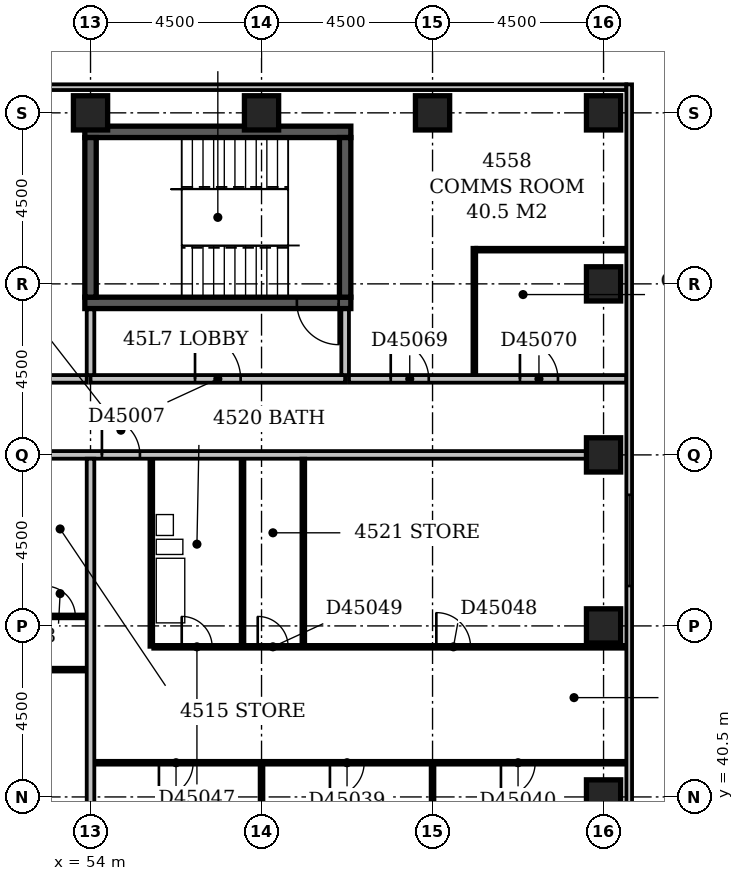
"""IFC4 building model, lengths in metres.
Left out: names, types, materials, properties, quantities, classifications, styles, units other than length and angle.
Written with IfcOpenShell. Run it as: python <this file> out.ifc"""

import sys

from ifc_helpers import new_model, si_unit, direction, frame, frame_2d, origin, origin_2d, place, context, subcontext, project, spatial, rectangle, extrude, element, fill, save


model = new_model("IFC4")
c1 = context("Model", 3, precision=1e-05, world=origin(), true_north=direction((0.0, 1.0)))
c2 = subcontext(c1, "Body", "Model", "MODEL_VIEW")
j1 = project(units=[si_unit("LENGTHUNIT", "METRE"), si_unit("PLANEANGLEUNIT", "RADIAN")], contexts=[c1])
p1 = place(None, origin())
s1 = spatial("IfcSite", under=j1, at=p1, CompositionType="ELEMENT")
p2 = place(p1, origin())
s2 = spatial("IfcBuilding", under=s1, at=p2, CompositionType="ELEMENT")
p3 = place(p2, frame((0.0, 0.0, 179.0)))
s3 = spatial("IfcBuildingStorey", under=s2, at=p3, CompositionType="ELEMENT", Elevation=179.0)
p4 = place(p3, frame((53.85, 53.5, -0.3), z_axis=(0.0, 0.0, 1.0), x_axis=(1.0, 0.0, 0.0)))
e1 = element("IfcWall", 1, at=p4, inside=s3, PredefinedType="SHEAR", context=c2, shape_type="SweptSolid", body=[
    extrude(rectangle(XDim=7.0, YDim=0.3, at=frame_2d((3.5, 0.0))), origin(), (0.0, 0.0, 1.0), 3.6),
])
p5 = place(p4, frame((5.58, 0.0, 0.3)))
e2 = element("IfcOpeningElement", 2, at=p5, cuts=e1, PredefinedType="OPENING", context=c2, shape_type="SweptSolid", body=[
    extrude(rectangle(XDim=1.1, YDim=2.1, at=frame_2d((0.55, 1.05))), frame((0.0, 0.162, 0.0), z_axis=(0.0, -1.0, 0.0), x_axis=(1.0, 0.0, 0.0)), (0.0, 0.0, 1.0), 0.324),
])
p6 = place(p3, frame((53.85, 58.0, -0.3), z_axis=(0.0, 0.0, 1.0), x_axis=(1.0, 0.0, 0.0)))
e3 = element("IfcWall", 3, at=p6, inside=s3, PredefinedType="SHEAR", context=c2, shape_type="SweptSolid", body=[
    extrude(rectangle(XDim=7.0, YDim=0.3, at=frame_2d((3.5, 0.0))), origin(), (0.0, 0.0, 1.0), 3.6),
])
for number, where, z_axis, x_axis in (
    (4, (54.0, 53.65, -0.3), (0.0, 0.0, 1.0), (0.0, 1.0, 0.0)),
    (5, (60.7, 53.65, -0.3), (0.0, 0.0, 1.0), (0.0, 1.0, 0.0)),
):
    element("IfcWall", number, at=place(p3, frame(where, z_axis=z_axis, x_axis=x_axis)), inside=s3, PredefinedType="SHEAR", context=c2, shape_type="SweptSolid", body=[
        extrude(rectangle(XDim=4.2, YDim=0.3, at=frame_2d((2.1, 0.0))), origin(), (0.0, 0.0, 1.0), 3.6),
    ])
for number, where, z_axis, x_axis in (
    (6, (67.5, 40.5, -0.3), (0.0, 0.0, 1.0), (1.0, 0.0, 0.0)),
    (7, (67.5, 45.0, -0.3), (0.0, 0.0, 1.0), (1.0, 0.0, 0.0)),
    (8, (67.5, 49.5, -0.3), (0.0, 0.0, 1.0), (1.0, 0.0, 0.0)),
    (9, (67.5, 54.0, -0.3), (0.0, 0.0, 1.0), (1.0, 0.0, 0.0)),
    (10, (54.0, 58.5, -0.3), (0.0, 0.0, 1.0), (1.0, 0.0, 0.0)),
    (11, (58.5, 58.5, -0.3), (0.0, 0.0, 1.0), (1.0, 0.0, 0.0)),
    (12, (63.0, 58.5, -0.3), (0.0, 0.0, 1.0), (1.0, 0.0, 0.0)),
    (13, (67.5, 58.5, -0.3), (0.0, 0.0, 1.0), (1.0, 0.0, 0.0)),
):
    element("IfcColumn", number, at=place(p3, frame(where, z_axis=z_axis, x_axis=x_axis)), inside=s3, PredefinedType="COLUMN", context=c2, shape_type="SweptSolid", body=[
        extrude(rectangle(XDim=0.9, YDim=0.9, at=origin_2d()), origin(), (0.0, 0.0, 1.0), 3.6),
    ])
p7 = place(p3, frame((68.175, 35.4, 0.0), z_axis=(0.0, 0.0, 1.0), x_axis=(0.0, 1.0, 0.0)))
e14 = element("IfcWall", 14, at=p7, inside=s3, PredefinedType="STANDARD", context=c2, shape_type="SweptSolid", body=[
    extrude(rectangle(XDim=23.85, YDim=0.15, at=frame_2d((11.925, 0.0))), origin(), (0.0, 0.0, 1.0), 2.7),
])
p8 = place(p7, frame((1.397, 0.0, 0.6)))
e15 = element("IfcOpeningElement", 15, at=p8, cuts=e14, PredefinedType="OPENING", context=c2, shape_type="SweptSolid", body=[
    extrude(rectangle(XDim=1.2, YDim=1.8, at=frame_2d((0.6, 0.9))), frame((0.0, 0.087, 0.0), z_axis=(0.0, -1.0, 0.0), x_axis=(1.0, 0.0, 0.0)), (0.0, 0.0, 1.0), 0.174),
])
p9 = place(p7, frame((10.65, 0.0, 0.6)))
e16 = element("IfcOpeningElement", 16, at=p9, cuts=e14, PredefinedType="OPENING", context=c2, shape_type="SweptSolid", body=[
    extrude(rectangle(XDim=2.4, YDim=1.8, at=frame_2d((1.2, 0.9))), frame((0.0, 0.087, 0.0), z_axis=(0.0, -1.0, 0.0), x_axis=(1.0, 0.0, 0.0)), (0.0, 0.0, 1.0), 0.174),
])
p10 = place(p3, frame((68.1, 59.175, 0.0), z_axis=(0.0, 0.0, 1.0), x_axis=(-1.0, 0.0, 0.0)))
e17 = element("IfcWall", 17, at=p10, inside=s3, PredefinedType="STANDARD", context=c2, shape_type="SweptSolid", body=[
    extrude(rectangle(XDim=68.85, YDim=0.15, at=frame_2d((34.425, 0.0))), origin(), (0.0, 0.0, 1.0), 2.7),
])
p11 = place(p3, frame((54.0, 51.5, 0.0), z_axis=(0.0, 0.0, 1.0), x_axis=(1.0, 0.0, 0.0)))
e18 = element("IfcWall", 18, at=p11, inside=s3, PredefinedType="PARTITIONING", context=c2, shape_type="SweptSolid", body=[
    extrude(rectangle(XDim=6.7, YDim=0.2, at=frame_2d((3.35, 0.0))), origin(), (0.0, 0.0, 1.0), 3.3),
])
p12 = place(p11, frame((2.75, 0.0, 0.0)))
e19 = element("IfcOpeningElement", 19, at=p12, cuts=e18, PredefinedType="OPENING", context=c2, shape_type="SweptSolid", body=[
    extrude(rectangle(XDim=1.2, YDim=2.1, at=frame_2d((0.6, 1.05))), frame((0.0, 0.112, 0.0), z_axis=(0.0, -1.0, 0.0), x_axis=(1.0, 0.0, 0.0)), (0.0, 0.0, 1.0), 0.224),
])
p13 = place(p3, frame((60.7, 51.6, 0.0), z_axis=(0.0, 0.0, 1.0), x_axis=(0.0, 1.0, 0.0)))
e20 = element("IfcWall", 20, at=p13, inside=s3, PredefinedType="PARTITIONING", context=c2, shape_type="SweptSolid", body=[
    extrude(rectangle(XDim=1.73, YDim=0.2, at=frame_2d((0.865, 0.0))), origin(), (0.0, 0.0, 1.0), 3.3),
])
p14 = place(p3, frame((54.0, 51.6, 0.0), z_axis=(0.0, 0.0, 1.0), x_axis=(0.0, 1.0, 0.0)))
e21 = element("IfcWall", 21, at=p14, inside=s3, PredefinedType="PARTITIONING", context=c2, shape_type="SweptSolid", body=[
    extrude(rectangle(XDim=1.73, YDim=0.2, at=frame_2d((0.865, 0.0))), origin(), (0.0, 0.0, 1.0), 2.6),
])
p15 = place(p3, frame((54.0, 36.45, 0.0), z_axis=(0.0, 0.0, 1.0), x_axis=(0.0, 1.0, 0.0)))
e22 = element("IfcWall", 22, at=p15, inside=s3, PredefinedType="PARTITIONING", context=c2, shape_type="SweptSolid", body=[
    extrude(rectangle(XDim=12.95, YDim=0.2, at=frame_2d((6.475, 0.0))), origin(), (0.0, 0.0, 1.0), 2.6),
])
p16 = place(p3, frame((58.5, 36.45, 0.0), z_axis=(0.0, 0.0, 1.0), x_axis=(0.0, 1.0, 0.0)))
e23 = element("IfcWall", 23, at=p16, inside=s3, PredefinedType="PARTITIONING", context=c2, shape_type="SweptSolid", body=[
    extrude(rectangle(XDim=4.9, YDim=0.1, at=frame_2d((2.45, 0.0))), origin(), (0.0, 0.0, 1.0), 3.3),
])
p17 = place(p3, frame((63.0, 36.45, 0.0), z_axis=(0.0, 0.0, 1.0), x_axis=(0.0, 1.0, 0.0)))
e24 = element("IfcWall", 24, at=p17, inside=s3, PredefinedType="PARTITIONING", context=c2, shape_type="SweptSolid", body=[
    extrude(rectangle(XDim=4.9, YDim=0.1, at=frame_2d((2.45, 0.0))), origin(), (0.0, 0.0, 1.0), 2.4),
])
p18 = place(p3, frame((54.1, 41.4, 0.0), z_axis=(0.0, 0.0, 1.0), x_axis=(1.0, 0.0, 0.0)))
e25 = element("IfcWall", 25, at=p18, inside=s3, PredefinedType="PARTITIONING", context=c2, shape_type="SweptSolid", body=[
    extrude(rectangle(XDim=14.0, YDim=0.1, at=frame_2d((7.0, 0.0))), origin(), (0.0, 0.0, 1.0), 3.3),
])
p19 = place(p18, frame((1.7, 0.0, 0.0)))
e26 = element("IfcOpeningElement", 26, at=p19, cuts=e25, PredefinedType="OPENING", context=c2, shape_type="SweptSolid", body=[
    extrude(rectangle(XDim=0.9, YDim=2.1, at=frame_2d((0.45, 1.05))), frame((0.0, 0.062, 0.0), z_axis=(0.0, -1.0, 0.0), x_axis=(1.0, 0.0, 0.0)), (0.0, 0.0, 1.0), 0.124),
])
p20 = place(p18, frame((6.2, 0.0, 0.0)))
e27 = element("IfcOpeningElement", 27, at=p20, cuts=e25, PredefinedType="OPENING", context=c2, shape_type="SweptSolid", body=[
    extrude(rectangle(XDim=0.9, YDim=2.1, at=frame_2d((0.45, 1.05))), frame((0.0, 0.062, 0.0), z_axis=(0.0, -1.0, 0.0), x_axis=(1.0, 0.0, 0.0)), (0.0, 0.0, 1.0), 0.124),
])
p21 = place(p18, frame((10.7, 0.0, 0.0)))
e28 = element("IfcOpeningElement", 28, at=p21, cuts=e25, PredefinedType="OPENING", context=c2, shape_type="SweptSolid", body=[
    extrude(rectangle(XDim=0.9, YDim=2.1, at=frame_2d((0.45, 1.05))), frame((0.0, 0.062, 0.0), z_axis=(0.0, -1.0, 0.0), x_axis=(1.0, 0.0, 0.0)), (0.0, 0.0, 1.0), 0.124),
])
p22 = place(p3, frame((40.6, 43.85, 0.0), z_axis=(0.0, 0.0, 1.0), x_axis=(1.0, 0.0, 0.0)))
e29 = element("IfcWall", 29, at=p22, inside=s3, PredefinedType="PARTITIONING", context=c2, shape_type="SweptSolid", body=[
    extrude(rectangle(XDim=13.3, YDim=0.1, at=frame_2d((6.65, 0.0))), origin(), (0.0, 0.0, 1.0), 3.3),
])
p23 = place(p22, frame((1.7, 0.0, 0.0)))
e30 = element("IfcOpeningElement", 30, at=p23, cuts=e29, PredefinedType="OPENING", context=c2, shape_type="SweptSolid", body=[
    extrude(rectangle(XDim=0.9, YDim=2.1, at=frame_2d((0.45, 1.05))), frame((0.0, 0.062, 0.0), z_axis=(0.0, -1.0, 0.0), x_axis=(1.0, 0.0, 0.0)), (0.0, 0.0, 1.0), 0.124),
])
p24 = place(p22, frame((6.2, 0.0, 0.0)))
e31 = element("IfcOpeningElement", 31, at=p24, cuts=e29, PredefinedType="OPENING", context=c2, shape_type="SweptSolid", body=[
    extrude(rectangle(XDim=0.9, YDim=2.1, at=frame_2d((0.45, 1.05))), frame((0.0, 0.062, 0.0), z_axis=(0.0, -1.0, 0.0), x_axis=(1.0, 0.0, 0.0)), (0.0, 0.0, 1.0), 0.124),
])
p25 = place(p22, frame((10.7, 0.0, 0.0)))
e32 = element("IfcOpeningElement", 32, at=p25, cuts=e29, PredefinedType="OPENING", context=c2, shape_type="SweptSolid", body=[
    extrude(rectangle(XDim=0.9, YDim=2.1, at=frame_2d((0.45, 1.05))), frame((0.0, 0.062, 0.0), z_axis=(0.0, -1.0, 0.0), x_axis=(1.0, 0.0, 0.0)), (0.0, 0.0, 1.0), 0.124),
])
p26 = place(p3, frame((55.6, 44.45, 0.0), z_axis=(0.0, 0.0, 1.0), x_axis=(0.0, 1.0, 0.0)))
e33 = element("IfcWall", 33, at=p26, inside=s3, PredefinedType="PLUMBINGWALL", context=c2, shape_type="SweptSolid", body=[
    extrude(rectangle(XDim=4.95, YDim=0.1, at=frame_2d((2.475, 0.0))), origin(), (0.0, 0.0, 1.0), 3.3),
])
p27 = place(p3, frame((55.65, 44.45, 0.0), z_axis=(0.0, 0.0, 1.0), x_axis=(1.0, 0.0, 0.0)))
e34 = element("IfcWall", 34, at=p27, inside=s3, PredefinedType="PARTITIONING", context=c2, shape_type="SweptSolid", body=[
    extrude(rectangle(XDim=12.45, YDim=0.1, at=frame_2d((6.225, 0.0))), origin(), (0.0, 0.0, 1.0), 3.3),
])
p28 = place(p27, frame((0.75, 0.0, 0.0)))
e35 = element("IfcOpeningElement", 35, at=p28, cuts=e34, PredefinedType="OPENING", context=c2, shape_type="SweptSolid", body=[
    extrude(rectangle(XDim=0.8, YDim=2.1, at=frame_2d((0.4, 1.05))), frame((0.0, 0.062, 0.0), z_axis=(0.0, -1.0, 0.0), x_axis=(1.0, 0.0, 0.0)), (0.0, 0.0, 1.0), 0.124),
])
p29 = place(p27, frame((7.45, 0.0, 0.0)))
e36 = element("IfcOpeningElement", 36, at=p29, cuts=e34, PredefinedType="OPENING", context=c2, shape_type="SweptSolid", body=[
    extrude(rectangle(XDim=0.9, YDim=2.1, at=frame_2d((0.45, 1.05))), frame((0.0, 0.062, 0.0), z_axis=(0.0, -1.0, 0.0), x_axis=(1.0, 0.0, 0.0)), (0.0, 0.0, 1.0), 0.124),
])
p30 = place(p27, frame((2.75, 0.0, 0.0)))
e37 = element("IfcOpeningElement", 37, at=p30, cuts=e34, PredefinedType="OPENING", context=c2, shape_type="SweptSolid", body=[
    extrude(rectangle(XDim=0.8, YDim=2.1, at=frame_2d((0.4, 1.05))), frame((0.0, 0.062, 0.0), z_axis=(0.0, -1.0, 0.0), x_axis=(1.0, 0.0, 0.0)), (0.0, 0.0, 1.0), 0.124),
])
p31 = place(p3, frame((58.0, 44.5, 0.0), z_axis=(0.0, 0.0, 1.0), x_axis=(0.0, 1.0, 0.0)))
e38 = element("IfcWall", 38, at=p31, inside=s3, PredefinedType="PLUMBINGWALL", context=c2, shape_type="SweptSolid", body=[
    extrude(rectangle(XDim=4.9, YDim=0.1, at=frame_2d((2.45, 0.0))), origin(), (0.0, 0.0, 1.0), 3.3),
])
p32 = place(p3, frame((59.6, 44.5, 0.0), z_axis=(0.0, 0.0, 1.0), x_axis=(0.0, 1.0, 0.0)))
e39 = element("IfcWall", 39, at=p32, inside=s3, PredefinedType="PARTITIONING", context=c2, shape_type="SweptSolid", body=[
    extrude(rectangle(XDim=4.9, YDim=0.1, at=frame_2d((2.45, 0.0))), origin(), (0.0, 0.0, 1.0), 3.3),
])
p33 = place(p3, frame((50.05, 45.25, 0.0), z_axis=(0.0, 0.0, 1.0), x_axis=(1.0, 0.0, 0.0)))
e40 = element("IfcWall", 40, at=p33, inside=s3, PredefinedType="PARTITIONING", context=c2, shape_type="SweptSolid", body=[
    extrude(rectangle(XDim=3.85, YDim=0.1, at=frame_2d((1.925, 0.0))), origin(), (0.0, 0.0, 1.0), 3.3),
])
p34 = place(p33, frame((0.75, 0.0, 0.0)))
e41 = element("IfcOpeningElement", 41, at=p34, cuts=e40, PredefinedType="OPENING", context=c2, shape_type="SweptSolid", body=[
    extrude(rectangle(XDim=0.8, YDim=2.1, at=frame_2d((0.4, 1.05))), frame((0.0, 0.062, 0.0), z_axis=(0.0, -1.0, 0.0), x_axis=(1.0, 0.0, 0.0)), (0.0, 0.0, 1.0), 0.124),
])
p35 = place(p33, frame((2.75, 0.0, 0.0)))
e42 = element("IfcOpeningElement", 42, at=p35, cuts=e40, PredefinedType="OPENING", context=c2, shape_type="SweptSolid", body=[
    extrude(rectangle(XDim=0.8, YDim=2.1, at=frame_2d((0.4, 1.05))), frame((0.0, 0.062, 0.0), z_axis=(0.0, -1.0, 0.0), x_axis=(1.0, 0.0, 0.0)), (0.0, 0.0, 1.0), 0.124),
])
p36 = place(p3, frame((22.6, 49.5, 0.0), z_axis=(0.0, 0.0, 1.0), x_axis=(1.0, 0.0, 0.0)))
e43 = element("IfcWall", 43, at=p36, inside=s3, PredefinedType="PARTITIONING", context=c2, shape_type="SweptSolid", body=[
    extrude(rectangle(XDim=44.45, YDim=0.2, at=frame_2d((22.225, 0.0))), origin(), (0.0, 0.0, 1.0), 3.3),
])
p37 = place(p36, frame((7.1, 0.0, 0.0)))
e44 = element("IfcOpeningElement", 44, at=p37, cuts=e43, PredefinedType="OPENING", context=c2, shape_type="SweptSolid", body=[
    extrude(rectangle(XDim=1.0, YDim=2.1, at=frame_2d((0.5, 1.05))), frame((0.0, 0.112, 0.0), z_axis=(0.0, -1.0, 0.0), x_axis=(1.0, 0.0, 0.0)), (0.0, 0.0, 1.0), 0.224),
])
p38 = place(p36, frame((26.1, 0.0, 0.0)))
e45 = element("IfcOpeningElement", 45, at=p38, cuts=e43, PredefinedType="OPENING", context=c2, shape_type="SweptSolid", body=[
    extrude(rectangle(XDim=1.0, YDim=2.1, at=frame_2d((0.5, 1.05))), frame((0.0, 0.112, 0.0), z_axis=(0.0, -1.0, 0.0), x_axis=(1.0, 0.0, 0.0)), (0.0, 0.0, 1.0), 0.224),
])
p39 = place(p36, frame((31.7, 0.0, 0.0)))
e46 = element("IfcOpeningElement", 46, at=p39, cuts=e43, PredefinedType="OPENING", context=c2, shape_type="SweptSolid", body=[
    extrude(rectangle(XDim=1.0, YDim=2.1, at=frame_2d((0.5, 1.05))), frame((0.0, 0.112, 0.0), z_axis=(0.0, -1.0, 0.0), x_axis=(1.0, 0.0, 0.0)), (0.0, 0.0, 1.0), 0.224),
])
p40 = place(p3, frame((44.1, 51.5, 0.0), z_axis=(0.0, 0.0, 1.0), x_axis=(1.0, 0.0, 0.0)))
e47 = element("IfcWall", 47, at=p40, inside=s3, PredefinedType="PARTITIONING", context=c2, shape_type="SweptSolid", body=[
    extrude(rectangle(XDim=9.8, YDim=0.2, at=frame_2d((4.9, 0.0))), origin(), (0.0, 0.0, 1.0), 3.3),
])
p41 = place(p40, frame((1.9, 0.0, 0.0)))
e48 = element("IfcOpeningElement", 48, at=p41, cuts=e47, PredefinedType="OPENING", context=c2, shape_type="SweptSolid", body=[
    extrude(rectangle(XDim=1.0, YDim=2.1, at=frame_2d((0.5, 1.05))), frame((0.0, 0.112, 0.0), z_axis=(0.0, -1.0, 0.0), x_axis=(1.0, 0.0, 0.0)), (0.0, 0.0, 1.0), 0.224),
])
p42 = place(p40, frame((6.9, 0.0, 0.0)))
e49 = element("IfcOpeningElement", 49, at=p42, cuts=e47, PredefinedType="OPENING", context=c2, shape_type="SweptSolid", body=[
    extrude(rectangle(XDim=1.0, YDim=2.1, at=frame_2d((0.5, 1.05))), frame((0.0, 0.112, 0.0), z_axis=(0.0, -1.0, 0.0), x_axis=(1.0, 0.0, 0.0)), (0.0, 0.0, 1.0), 0.224),
])
p43 = place(p3, frame((60.8, 51.5, 0.0), z_axis=(0.0, 0.0, 1.0), x_axis=(1.0, 0.0, 0.0)))
e50 = element("IfcWall", 50, at=p43, inside=s3, PredefinedType="PARTITIONING", context=c2, shape_type="SweptSolid", body=[
    extrude(rectangle(XDim=7.3, YDim=0.2, at=frame_2d((3.65, 0.0))), origin(), (0.0, 0.0, 1.0), 3.3),
])
p44 = place(p43, frame((1.1, 0.0, 0.0)))
e51 = element("IfcOpeningElement", 51, at=p44, cuts=e50, PredefinedType="OPENING", context=c2, shape_type="SweptSolid", body=[
    extrude(rectangle(XDim=1.0, YDim=2.1, at=frame_2d((0.5, 1.05))), frame((0.0, 0.112, 0.0), z_axis=(0.0, -1.0, 0.0), x_axis=(1.0, 0.0, 0.0)), (0.0, 0.0, 1.0), 0.224),
])
p45 = place(p43, frame((4.5, 0.0, 0.0)))
e52 = element("IfcOpeningElement", 52, at=p45, cuts=e50, PredefinedType="OPENING", context=c2, shape_type="SweptSolid", body=[
    extrude(rectangle(XDim=1.0, YDim=2.1, at=frame_2d((0.5, 1.05))), frame((0.0, 0.112, 0.0), z_axis=(0.0, -1.0, 0.0), x_axis=(1.0, 0.0, 0.0)), (0.0, 0.0, 1.0), 0.224),
])
p46 = place(p3, frame((64.1, 51.6, 0.0), z_axis=(0.0, 0.0, 1.0), x_axis=(0.0, 1.0, 0.0)))
e53 = element("IfcWall", 53, at=p46, inside=s3, PredefinedType="PARTITIONING", context=c2, shape_type="SweptSolid", body=[
    extrude(rectangle(XDim=3.35, YDim=0.1, at=frame_2d((1.675, 0.0))), origin(), (0.0, 0.0, 1.0), 3.3),
])
p47 = place(p3, frame((64.15, 54.9, 0.0), z_axis=(0.0, 0.0, 1.0), x_axis=(1.0, 0.0, 0.0)))
e54 = element("IfcWall", 54, at=p47, inside=s3, PredefinedType="PARTITIONING", context=c2, shape_type="SweptSolid", body=[
    extrude(rectangle(XDim=3.95, YDim=0.1, at=frame_2d((1.975, 0.0))), origin(), (0.0, 0.0, 1.0), 3.3),
])
p48 = place(p9, origin())
e55 = element("IfcWindow", 55, at=p48, inside=s3, PartitioningType="SINGLE_PANEL", PredefinedType="WINDOW", context=c2, shape_type="SweptSolid", body=[
    extrude(rectangle(XDim=2.4, YDim=1.8, at=frame_2d((1.2, 0.9))), frame((0.0, 0.03, 0.0), z_axis=(0.0, -1.0, 0.0), x_axis=(1.0, 0.0, 0.0)), (0.0, 0.0, 1.0), 0.06),
])
fill(e16, e55)
p49 = place(p12, origin())
e56 = element("IfcDoor", 56, at=p49, inside=s3, OperationType="SINGLE_SWING_LEFT", PredefinedType="DOOR", context=c2, shape_type="SweptSolid", body=[
    extrude(rectangle(XDim=1.2, YDim=2.1, at=frame_2d((0.6, 1.05))), frame((0.0, 0.025, 0.0), z_axis=(0.0, -1.0, 0.0), x_axis=(1.0, 0.0, 0.0)), (0.0, 0.0, 1.0), 0.05),
])
fill(e19, e56)
p50 = place(p5, origin())
e57 = element("IfcDoor", 57, at=p50, inside=s3, OperationType="SINGLE_SWING_RIGHT", PredefinedType="DOOR", context=c2, shape_type="SweptSolid", body=[
    extrude(rectangle(XDim=1.1, YDim=2.1, at=frame_2d((0.55, 1.05))), frame((0.0, 0.025, 0.0), z_axis=(0.0, -1.0, 0.0), x_axis=(1.0, 0.0, 0.0)), (0.0, 0.0, 1.0), 0.05),
])
fill(e2, e57)
p51 = place(p19, frame((0.9, 0.0, 0.0), z_axis=(0.0, 0.0, 1.0), x_axis=(-1.0, 0.0, 0.0)))
e58 = element("IfcDoor", 58, at=p51, inside=s3, OperationType="SINGLE_SWING_RIGHT", PredefinedType="DOOR", context=c2, shape_type="SweptSolid", body=[
    extrude(rectangle(XDim=0.9, YDim=2.1, at=frame_2d((0.45, 1.05))), frame((0.0, 0.025, 0.0), z_axis=(0.0, -1.0, 0.0), x_axis=(1.0, 0.0, 0.0)), (0.0, 0.0, 1.0), 0.05),
])
fill(e26, e58)
p52 = place(p20, frame((0.9, 0.0, 0.0), z_axis=(0.0, 0.0, 1.0), x_axis=(-1.0, 0.0, 0.0)))
e59 = element("IfcDoor", 59, at=p52, inside=s3, OperationType="SINGLE_SWING_RIGHT", PredefinedType="DOOR", context=c2, shape_type="SweptSolid", body=[
    extrude(rectangle(XDim=0.9, YDim=2.1, at=frame_2d((0.45, 1.05))), frame((0.0, 0.025, 0.0), z_axis=(0.0, -1.0, 0.0), x_axis=(1.0, 0.0, 0.0)), (0.0, 0.0, 1.0), 0.05),
])
fill(e27, e59)
p53 = place(p21, frame((0.9, 0.0, 0.0), z_axis=(0.0, 0.0, 1.0), x_axis=(-1.0, 0.0, 0.0)))
e60 = element("IfcDoor", 60, at=p53, inside=s3, OperationType="SINGLE_SWING_RIGHT", PredefinedType="DOOR", context=c2, shape_type="SweptSolid", body=[
    extrude(rectangle(XDim=0.9, YDim=2.1, at=frame_2d((0.45, 1.05))), frame((0.0, 0.025, 0.0), z_axis=(0.0, -1.0, 0.0), x_axis=(1.0, 0.0, 0.0)), (0.0, 0.0, 1.0), 0.05),
])
fill(e28, e60)
p54 = place(p28, origin())
e61 = element("IfcDoor", 61, at=p54, inside=s3, OperationType="SINGLE_SWING_LEFT", PredefinedType="DOOR", context=c2, shape_type="SweptSolid", body=[
    extrude(rectangle(XDim=0.8, YDim=2.1, at=frame_2d((0.4, 1.05))), frame((0.0, 0.025, 0.0), z_axis=(0.0, -1.0, 0.0), x_axis=(1.0, 0.0, 0.0)), (0.0, 0.0, 1.0), 0.05),
])
fill(e35, e61)
p55 = place(p29, origin())
e62 = element("IfcDoor", 62, at=p55, inside=s3, OperationType="SINGLE_SWING_LEFT", PredefinedType="DOOR", context=c2, shape_type="SweptSolid", body=[
    extrude(rectangle(XDim=0.9, YDim=2.1, at=frame_2d((0.45, 1.05))), frame((0.0, 0.025, 0.0), z_axis=(0.0, -1.0, 0.0), x_axis=(1.0, 0.0, 0.0)), (0.0, 0.0, 1.0), 0.05),
])
fill(e36, e62)
p56 = place(p30, origin())
e63 = element("IfcDoor", 63, at=p56, inside=s3, OperationType="SINGLE_SWING_LEFT", PredefinedType="DOOR", context=c2, shape_type="SweptSolid", body=[
    extrude(rectangle(XDim=0.8, YDim=2.1, at=frame_2d((0.4, 1.05))), frame((0.0, 0.025, 0.0), z_axis=(0.0, -1.0, 0.0), x_axis=(1.0, 0.0, 0.0)), (0.0, 0.0, 1.0), 0.05),
])
fill(e37, e63)
p57 = place(p35, origin())
e64 = element("IfcDoor", 64, at=p57, inside=s3, OperationType="SINGLE_SWING_LEFT", PredefinedType="DOOR", context=c2, shape_type="SweptSolid", body=[
    extrude(rectangle(XDim=0.8, YDim=2.1, at=frame_2d((0.4, 1.05))), frame((0.0, 0.025, 0.0), z_axis=(0.0, -1.0, 0.0), x_axis=(1.0, 0.0, 0.0)), (0.0, 0.0, 1.0), 0.05),
])
fill(e42, e64)
p58 = place(p39, origin())
e65 = element("IfcDoor", 65, at=p58, inside=s3, OperationType="SINGLE_SWING_LEFT", PredefinedType="DOOR", context=c2, shape_type="SweptSolid", body=[
    extrude(rectangle(XDim=1.0, YDim=2.1, at=frame_2d((0.5, 1.05))), frame((0.0, 0.025, 0.0), z_axis=(0.0, -1.0, 0.0), x_axis=(1.0, 0.0, 0.0)), (0.0, 0.0, 1.0), 0.05),
])
fill(e46, e65)
p59 = place(p44, origin())
e66 = element("IfcDoor", 66, at=p59, inside=s3, OperationType="SINGLE_SWING_LEFT", PredefinedType="DOOR", context=c2, shape_type="SweptSolid", body=[
    extrude(rectangle(XDim=1.0, YDim=2.1, at=frame_2d((0.5, 1.05))), frame((0.0, 0.025, 0.0), z_axis=(0.0, -1.0, 0.0), x_axis=(1.0, 0.0, 0.0)), (0.0, 0.0, 1.0), 0.05),
])
fill(e51, e66)
p60 = place(p45, origin())
e67 = element("IfcDoor", 67, at=p60, inside=s3, OperationType="SINGLE_SWING_LEFT", PredefinedType="DOOR", context=c2, shape_type="SweptSolid", body=[
    extrude(rectangle(XDim=1.0, YDim=2.1, at=frame_2d((0.5, 1.05))), frame((0.0, 0.025, 0.0), z_axis=(0.0, -1.0, 0.0), x_axis=(1.0, 0.0, 0.0)), (0.0, 0.0, 1.0), 0.05),
])
fill(e52, e67)
save(model, sys.argv[1])
